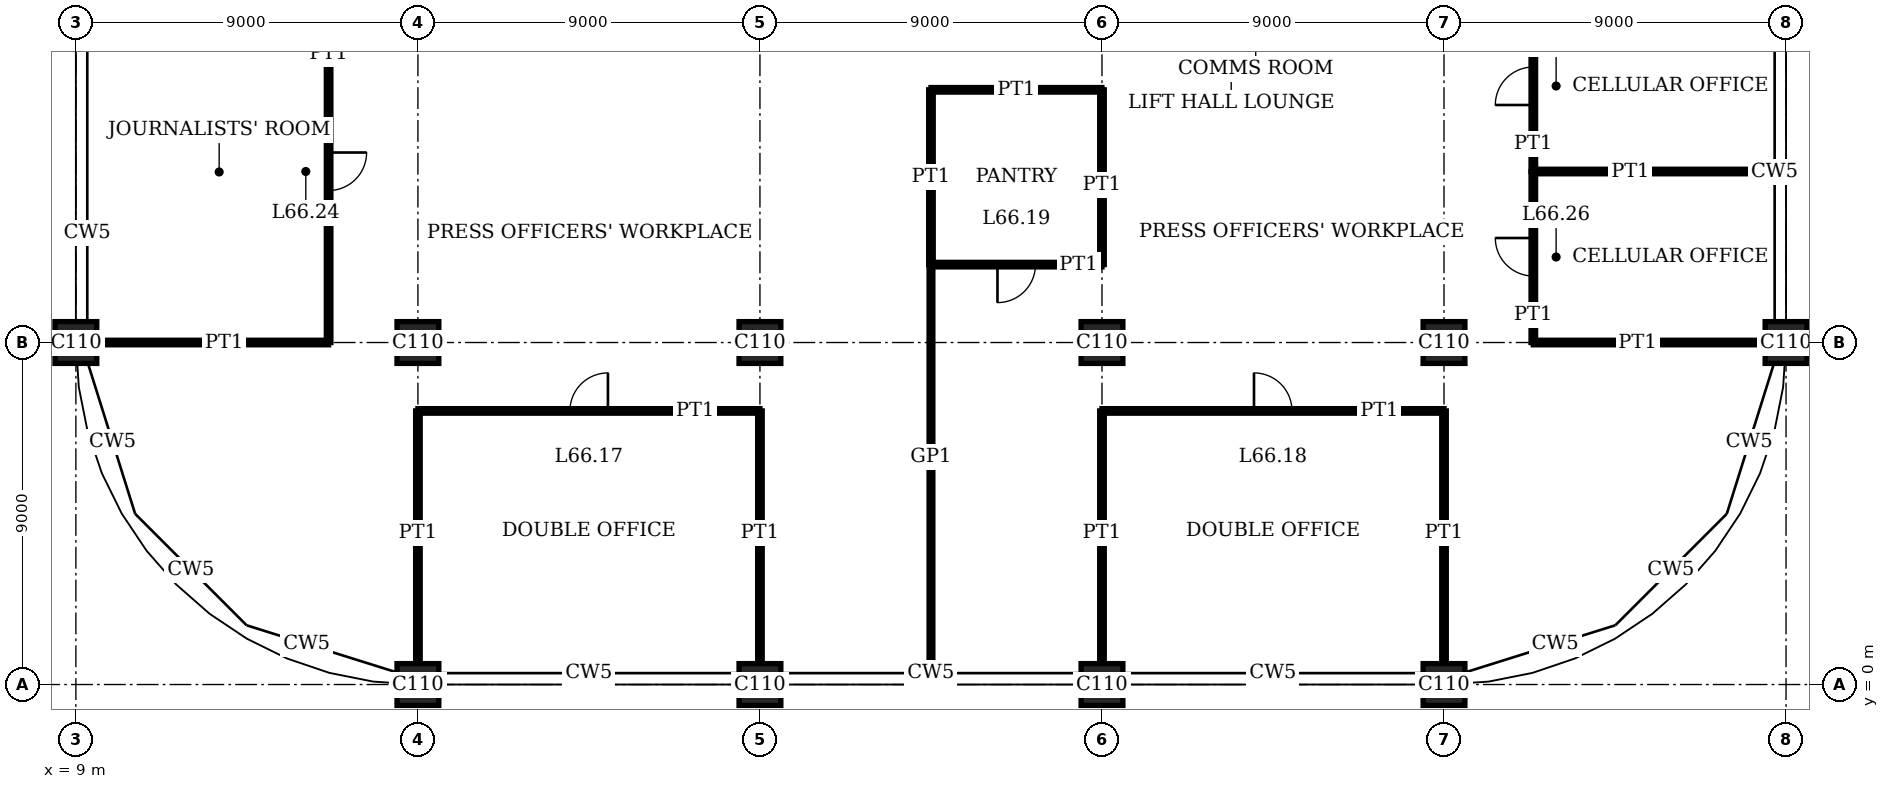
"""IFC4 building model, lengths in metres.
Left out: names, types, materials, properties, quantities, classifications, styles, units other than length and angle.
Written with IfcOpenShell. Run it as: python <this file> out.ifc"""

import sys

from ifc_helpers import new_model, si_unit, direction, frame, frame_2d, origin, origin_2d, place, context, subcontext, project, spatial, rectangle, extrude, element, fill, save


model = new_model("IFC4")
c1 = context("Model", 3, precision=1e-05, world=origin(), true_north=direction((0.0, 1.0)))
c2 = subcontext(c1, "Body", "Model", "MODEL_VIEW")
j1 = project(units=[si_unit("LENGTHUNIT", "METRE"), si_unit("PLANEANGLEUNIT", "RADIAN")], contexts=[c1])
p1 = place(None, origin())
s1 = spatial("IfcSite", under=j1, at=p1, CompositionType="ELEMENT")
p2 = place(p1, origin())
s2 = spatial("IfcBuilding", under=s1, at=p2, CompositionType="ELEMENT")
p3 = place(p2, frame((0.0, 0.0, 271.4)))
s3 = spatial("IfcBuildingStorey", under=s2, at=p3, CompositionType="ELEMENT", Elevation=271.4)
for number, where, z_axis, x_axis in (
    (1, (9.0, 9.0, 0.0), (0.0, 0.0, 1.0), (1.0, 0.0, 0.0)),
    (2, (18.0, 0.0, 0.0), (0.0, 0.0, 1.0), (1.0, 0.0, 0.0)),
    (3, (18.0, 9.0, 0.0), (0.0, 0.0, 1.0), (1.0, 0.0, 0.0)),
    (4, (27.0, 0.0, 0.0), (0.0, 0.0, 1.0), (1.0, 0.0, 0.0)),
    (5, (27.0, 9.0, 0.0), (0.0, 0.0, 1.0), (1.0, 0.0, 0.0)),
    (6, (36.0, 0.0, 0.0), (0.0, 0.0, 1.0), (1.0, 0.0, 0.0)),
    (7, (36.0, 9.0, 0.0), (0.0, 0.0, 1.0), (1.0, 0.0, 0.0)),
    (8, (45.0, 0.0, 0.0), (0.0, 0.0, 1.0), (1.0, 0.0, 0.0)),
    (9, (45.0, 9.0, 0.0), (0.0, 0.0, 1.0), (1.0, 0.0, 0.0)),
    (10, (54.0, 9.0, 0.0), (0.0, 0.0, 1.0), (1.0, 0.0, 0.0)),
):
    element("IfcColumn", number, at=place(p3, frame(where, z_axis=z_axis, x_axis=x_axis)), inside=s3, PredefinedType="COLUMN", context=c2, shape_type="SweptSolid", body=[
        extrude(rectangle(XDim=1.1, YDim=1.1, at=origin_2d()), origin(), (0.0, 0.0, 1.0), 4.0),
    ])
p4 = place(p3, frame((18.0, 7.2, 0.0), z_axis=(0.0, 0.0, 1.0), x_axis=(1.0, 0.0, 0.0)))
e11 = element("IfcWall", 11, at=p4, inside=s3, PredefinedType="PARTITIONING", context=c2, shape_type="SweptSolid", body=[
    extrude(rectangle(XDim=9.0, YDim=0.12, at=frame_2d((4.5, 0.0))), origin(), (0.0, 0.0, 1.0), 3.75),
])
p5 = place(p4, frame((4.0, 0.0, 0.0)))
e12 = element("IfcOpeningElement", 12, at=p5, cuts=e11, PredefinedType="OPENING", context=c2, shape_type="SweptSolid", body=[
    extrude(rectangle(XDim=1.0, YDim=2.4, at=frame_2d((0.5, 1.2))), frame((0.0, 0.07, 0.0), z_axis=(0.0, -1.0, 0.0), x_axis=(1.0, 0.0, 0.0)), (0.0, 0.0, 1.0), 0.14),
])
p6 = place(p3, frame((36.0, 7.2, 0.0), z_axis=(0.0, 0.0, 1.0), x_axis=(1.0, 0.0, 0.0)))
e13 = element("IfcWall", 13, at=p6, inside=s3, PredefinedType="PARTITIONING", context=c2, shape_type="SweptSolid", body=[
    extrude(rectangle(XDim=9.0, YDim=0.12, at=frame_2d((4.5, 0.0))), origin(), (0.0, 0.0, 1.0), 3.75),
])
p7 = place(p6, frame((4.0, 0.0, 0.0)))
e14 = element("IfcOpeningElement", 14, at=p7, cuts=e13, PredefinedType="OPENING", context=c2, shape_type="SweptSolid", body=[
    extrude(rectangle(XDim=1.0, YDim=2.4, at=frame_2d((0.5, 1.2))), frame((0.0, 0.07, 0.0), z_axis=(0.0, -1.0, 0.0), x_axis=(1.0, 0.0, 0.0)), (0.0, 0.0, 1.0), 0.14),
])
for number, where, z_axis, x_axis in (
    (15, (9.55, 9.0, 0.0), (0.0, 0.0, 1.0), (1.0, 0.0, 0.0)),
    (16, (47.35, 9.0, 0.0), (0.0, 0.0, 1.0), (1.0, 0.0, 0.0)),
):
    element("IfcWall", number, at=place(p3, frame(where, z_axis=z_axis, x_axis=x_axis)), inside=s3, PredefinedType="PARTITIONING", context=c2, shape_type="SweptSolid", body=[
        extrude(rectangle(XDim=6.1, YDim=0.12, at=frame_2d((3.05, 0.0))), origin(), (0.0, 0.0, 1.0), 3.05),
    ])
p8 = place(p3, frame((31.5, 11.05, 0.0), z_axis=(0.0, 0.0, 1.0), x_axis=(1.0, 0.0, 0.0)))
e17 = element("IfcWall", 17, at=p8, inside=s3, PredefinedType="PARTITIONING", context=c2, shape_type="SweptSolid", body=[
    extrude(rectangle(XDim=4.5, YDim=0.12, at=frame_2d((2.25, 0.0))), origin(), (0.0, 0.0, 1.0), 3.75),
])
p9 = place(p8, frame((1.75, 0.0, 0.0)))
e18 = element("IfcOpeningElement", 18, at=p9, cuts=e17, PredefinedType="OPENING", context=c2, shape_type="SweptSolid", body=[
    extrude(rectangle(XDim=1.0, YDim=2.4, at=frame_2d((0.5, 1.2))), frame((0.0, 0.07, 0.0), z_axis=(0.0, -1.0, 0.0), x_axis=(1.0, 0.0, 0.0)), (0.0, 0.0, 1.0), 0.14),
])
p10 = place(p3, frame((47.35, 13.5, 0.0), z_axis=(0.0, 0.0, 1.0), x_axis=(1.0, 0.0, 0.0)))
e19 = element("IfcWall", 19, at=p10, inside=s3, PredefinedType="PARTITIONING", context=c2, shape_type="SweptSolid", body=[
    extrude(rectangle(XDim=6.34, YDim=0.12, at=frame_2d((3.17, 0.0))), origin(), (0.0, 0.0, 1.0), 3.1),
])
p11 = place(p3, frame((31.5, 15.65, 0.0), z_axis=(0.0, 0.0, 1.0), x_axis=(1.0, 0.0, 0.0)))
e20 = element("IfcWall", 20, at=p11, inside=s3, PredefinedType="PARTITIONING", context=c2, shape_type="SweptSolid", body=[
    extrude(rectangle(XDim=4.5, YDim=0.12, at=frame_2d((2.25, 0.0))), origin(), (0.0, 0.0, 1.0), 3.75),
])
p12 = place(p3, frame((15.65, 9.0, 0.0), z_axis=(0.0, 0.0, 1.0), x_axis=(0.0, 1.0, 0.0)))
e21 = element("IfcWall", 21, at=p12, inside=s3, PredefinedType="PARTITIONING", context=c2, shape_type="SweptSolid", body=[
    extrude(rectangle(XDim=9.0, YDim=0.12, at=frame_2d((4.5, 0.0))), origin(), (0.0, 0.0, 1.0), 3.75),
])
p13 = place(p12, frame((4.0, 0.0, 0.0)))
e22 = element("IfcOpeningElement", 22, at=p13, cuts=e21, PredefinedType="OPENING", context=c2, shape_type="SweptSolid", body=[
    extrude(rectangle(XDim=1.0, YDim=2.4, at=frame_2d((0.5, 1.2))), frame((0.0, 0.07, 0.0), z_axis=(0.0, -1.0, 0.0), x_axis=(1.0, 0.0, 0.0)), (0.0, 0.0, 1.0), 0.14),
])
for number, where, z_axis, x_axis in (
    (23, (18.0, 0.55, 0.0), (0.0, 0.0, 1.0), (0.0, 1.0, 0.0)),
    (24, (27.0, 0.55, 0.0), (0.0, 0.0, 1.0), (0.0, 1.0, 0.0)),
):
    element("IfcWall", number, at=place(p3, frame(where, z_axis=z_axis, x_axis=x_axis)), inside=s3, PredefinedType="PARTITIONING", context=c2, shape_type="SweptSolid", body=[
        extrude(rectangle(XDim=6.65, YDim=0.12, at=frame_2d((3.325, 0.0))), origin(), (0.0, 0.0, 1.0), 3.05),
    ])
p14 = place(p3, frame((31.5, 11.05, 0.0), z_axis=(0.0, 0.0, 1.0), x_axis=(0.0, 1.0, 0.0)))
e25 = element("IfcWall", 25, at=p14, inside=s3, PredefinedType="PARTITIONING", context=c2, shape_type="SweptSolid", body=[
    extrude(rectangle(XDim=4.6, YDim=0.12, at=frame_2d((2.3, 0.0))), origin(), (0.0, 0.0, 1.0), 3.75),
])
p15 = place(p3, frame((31.5, 0.31, 0.0), z_axis=(0.0, 0.0, 1.0), x_axis=(0.0, 1.0, 0.0)))
e26 = element("IfcWall", 26, at=p15, inside=s3, PredefinedType="PARTITIONING", context=c2, shape_type="SweptSolid", body=[
    extrude(rectangle(XDim=10.74, YDim=0.1, at=frame_2d((5.37, 0.0))), origin(), (0.0, 0.0, 1.0), 3.75),
])
p16 = place(p3, frame((36.0, 0.55, 0.0), z_axis=(0.0, 0.0, 1.0), x_axis=(0.0, 1.0, 0.0)))
e27 = element("IfcWall", 27, at=p16, inside=s3, PredefinedType="PARTITIONING", context=c2, shape_type="SweptSolid", body=[
    extrude(rectangle(XDim=6.65, YDim=0.12, at=frame_2d((3.325, 0.0))), origin(), (0.0, 0.0, 1.0), 3.05),
])
p17 = place(p3, frame((36.0, 11.05, 0.0), z_axis=(0.0, 0.0, 1.0), x_axis=(0.0, 1.0, 0.0)))
e28 = element("IfcWall", 28, at=p17, inside=s3, PredefinedType="PARTITIONING", context=c2, shape_type="SweptSolid", body=[
    extrude(rectangle(XDim=4.6, YDim=0.12, at=frame_2d((2.3, 0.0))), origin(), (0.0, 0.0, 1.0), 3.05),
])
p18 = place(p3, frame((45.0, 0.55, 0.0), z_axis=(0.0, 0.0, 1.0), x_axis=(0.0, 1.0, 0.0)))
e29 = element("IfcWall", 29, at=p18, inside=s3, PredefinedType="PARTITIONING", context=c2, shape_type="SweptSolid", body=[
    extrude(rectangle(XDim=6.65, YDim=0.12, at=frame_2d((3.325, 0.0))), origin(), (0.0, 0.0, 1.0), 3.05),
])
p19 = place(p3, frame((47.35, 9.0, 0.0), z_axis=(0.0, 0.0, 1.0), x_axis=(0.0, 1.0, 0.0)))
e30 = element("IfcWall", 30, at=p19, inside=s3, PredefinedType="PARTITIONING", context=c2, shape_type="SweptSolid", body=[
    extrude(rectangle(XDim=4.5, YDim=0.12, at=frame_2d((2.25, 0.0))), origin(), (0.0, 0.0, 1.0), 3.75),
])
p20 = place(p19, frame((1.75, 0.0, 0.0)))
e31 = element("IfcOpeningElement", 31, at=p20, cuts=e30, PredefinedType="OPENING", context=c2, shape_type="SweptSolid", body=[
    extrude(rectangle(XDim=1.0, YDim=2.4, at=frame_2d((0.5, 1.2))), frame((0.0, 0.07, 0.0), z_axis=(0.0, -1.0, 0.0), x_axis=(1.0, 0.0, 0.0)), (0.0, 0.0, 1.0), 0.14),
])
p21 = place(p3, frame((47.35, 13.5, 0.0), z_axis=(0.0, 0.0, 1.0), x_axis=(0.0, 1.0, 0.0)))
e32 = element("IfcWall", 32, at=p21, inside=s3, PredefinedType="PARTITIONING", context=c2, shape_type="SweptSolid", body=[
    extrude(rectangle(XDim=4.5, YDim=0.12, at=frame_2d((2.25, 0.0))), origin(), (0.0, 0.0, 1.0), 3.75),
])
p22 = place(p21, frame((1.75, 0.0, 0.0)))
e33 = element("IfcOpeningElement", 33, at=p22, cuts=e32, PredefinedType="OPENING", context=c2, shape_type="SweptSolid", body=[
    extrude(rectangle(XDim=1.0, YDim=2.4, at=frame_2d((0.5, 1.2))), frame((0.0, 0.07, 0.0), z_axis=(0.0, -1.0, 0.0), x_axis=(1.0, 0.0, 0.0)), (0.0, 0.0, 1.0), 0.14),
])
p23 = place(p5, origin())
e34 = element("IfcDoor", 34, at=p23, inside=s3, OperationType="SINGLE_SWING_LEFT", PredefinedType="DOOR", context=c2, shape_type="SweptSolid", body=[
    extrude(rectangle(XDim=1.0, YDim=2.4, at=frame_2d((0.5, 1.2))), frame((0.0, 0.025, 0.0), z_axis=(0.0, -1.0, 0.0), x_axis=(1.0, 0.0, 0.0)), (0.0, 0.0, 1.0), 0.05),
])
fill(e12, e34)
p24 = place(p7, origin())
e35 = element("IfcDoor", 35, at=p24, inside=s3, OperationType="SINGLE_SWING_RIGHT", PredefinedType="DOOR", context=c2, shape_type="SweptSolid", body=[
    extrude(rectangle(XDim=1.0, YDim=2.4, at=frame_2d((0.5, 1.2))), frame((0.0, 0.025, 0.0), z_axis=(0.0, -1.0, 0.0), x_axis=(1.0, 0.0, 0.0)), (0.0, 0.0, 1.0), 0.05),
])
fill(e14, e35)
p25 = place(p9, origin())
e36 = element("IfcDoor", 36, at=p25, inside=s3, OperationType="SINGLE_SWING_LEFT", PredefinedType="DOOR", context=c2, shape_type="SweptSolid", body=[
    extrude(rectangle(XDim=1.0, YDim=2.4, at=frame_2d((0.5, 1.2))), frame((0.0, 0.025, 0.0), z_axis=(0.0, -1.0, 0.0), x_axis=(1.0, 0.0, 0.0)), (0.0, 0.0, 1.0), 0.05),
])
fill(e18, e36)
p26 = place(p13, origin())
e37 = element("IfcDoor", 37, at=p26, inside=s3, OperationType="SINGLE_SWING_RIGHT", PredefinedType="DOOR", context=c2, shape_type="SweptSolid", body=[
    extrude(rectangle(XDim=1.0, YDim=2.4, at=frame_2d((0.5, 1.2))), frame((0.0, 0.025, 0.0), z_axis=(0.0, -1.0, 0.0), x_axis=(1.0, 0.0, 0.0)), (0.0, 0.0, 1.0), 0.05),
])
fill(e22, e37)
p27 = place(p20, origin())
e38 = element("IfcDoor", 38, at=p27, inside=s3, OperationType="SINGLE_SWING_LEFT", PredefinedType="DOOR", context=c2, shape_type="SweptSolid", body=[
    extrude(rectangle(XDim=1.0, YDim=2.4, at=frame_2d((0.5, 1.2))), frame((0.0, 0.025, 0.0), z_axis=(0.0, -1.0, 0.0), x_axis=(1.0, 0.0, 0.0)), (0.0, 0.0, 1.0), 0.05),
])
fill(e31, e38)
p28 = place(p22, origin())
e39 = element("IfcDoor", 39, at=p28, inside=s3, OperationType="SINGLE_SWING_RIGHT", PredefinedType="DOOR", context=c2, shape_type="SweptSolid", body=[
    extrude(rectangle(XDim=1.0, YDim=2.4, at=frame_2d((0.5, 1.2))), frame((0.0, 0.025, 0.0), z_axis=(0.0, -1.0, 0.0), x_axis=(1.0, 0.0, 0.0)), (0.0, 0.0, 1.0), 0.05),
])
fill(e33, e39)
save(model, sys.argv[1])
